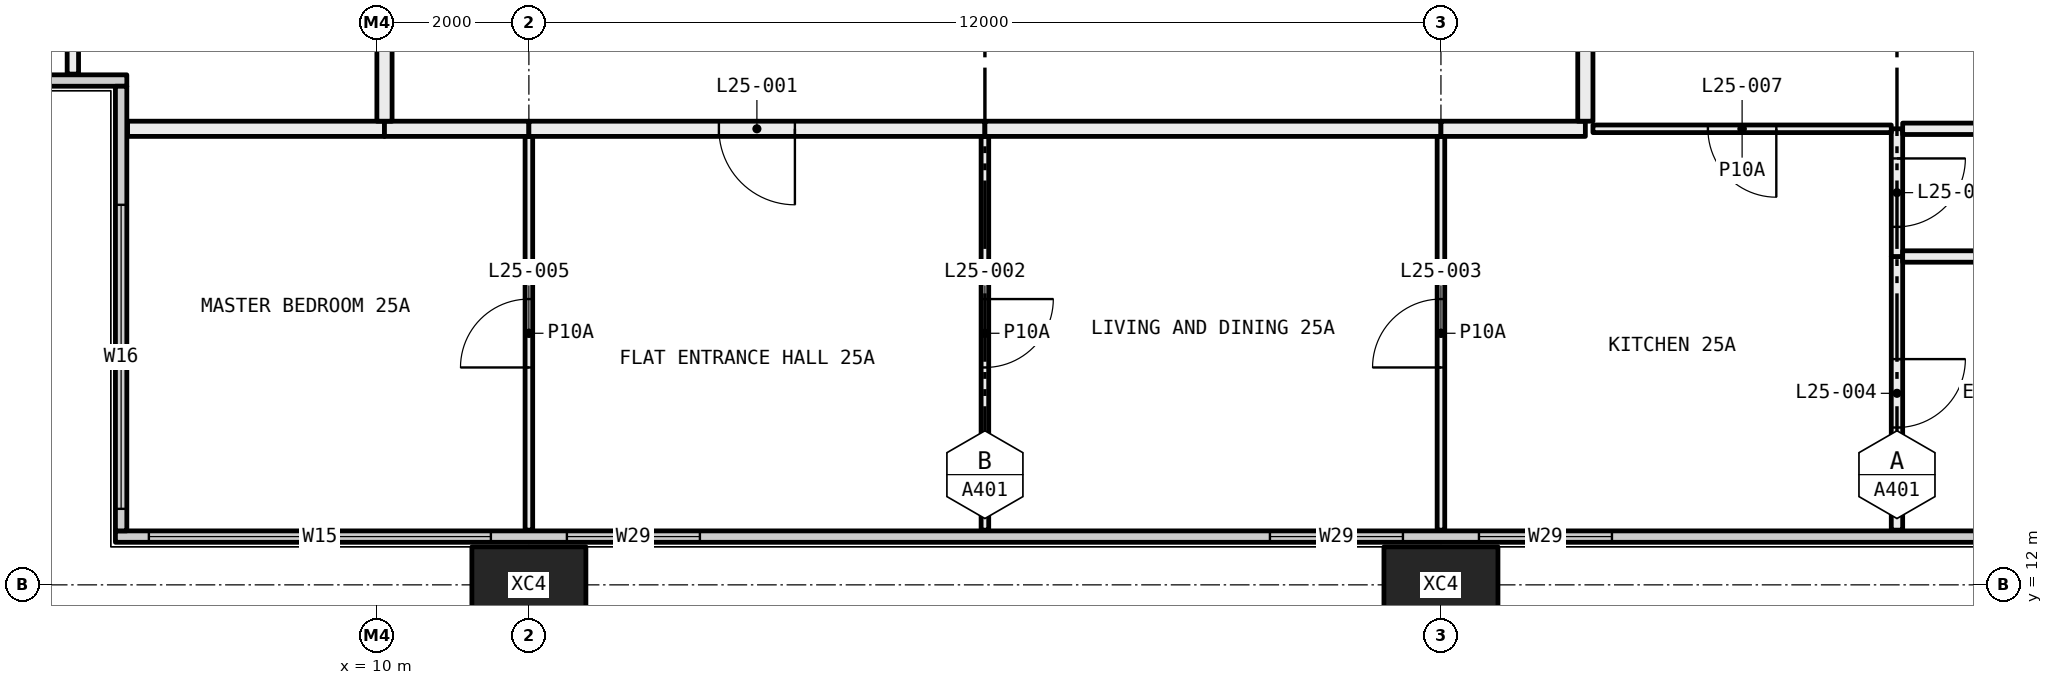
"""IFC4 building model, lengths in metres.
Left out: names, types, materials, properties, quantities, classifications, styles, units other than length and angle.
Written with IfcOpenShell. Run it as: python <this file> out.ifc"""

import sys

from ifc_helpers import new_model, si_unit, direction, frame, frame_2d, origin, origin_2d, place, context, subcontext, project, spatial, rectangle, hollow_rectangle, extrude, element, fill, save


model = new_model("IFC4")
c1 = context("Model", 3, precision=1e-05, world=origin(), true_north=direction((0.0, 1.0)))
c2 = subcontext(c1, "Body", "Model", "MODEL_VIEW")
j1 = project(units=[si_unit("LENGTHUNIT", "METRE"), si_unit("PLANEANGLEUNIT", "RADIAN")], contexts=[c1])
p1 = place(None, origin())
s1 = spatial("IfcSite", under=j1, at=p1, CompositionType="ELEMENT")
p2 = place(p1, origin())
s2 = spatial("IfcBuilding", under=s1, at=p2, CompositionType="ELEMENT")
p3 = place(p2, frame((0.0, 0.0, 100.05)))
s3 = spatial("IfcBuildingStorey", under=s2, at=p3, CompositionType="ELEMENT", Elevation=100.05)
for number, where, z_axis, x_axis in (
    (1, (12.0, 12.0, -0.4), (0.0, 0.0, 1.0), (1.0, 0.0, 0.0)),
    (2, (24.0, 12.0, -0.4), (0.0, 0.0, 1.0), (1.0, 0.0, 0.0)),
):
    element("IfcColumn", number, at=place(p3, frame(where, z_axis=z_axis, x_axis=x_axis)), inside=s3, PredefinedType="COLUMN", context=c2, shape_type="SweptSolid", body=[
        extrude(hollow_rectangle(XDim=1.5, YDim=1.0, WallThickness=0.06, at=origin_2d()), origin(), (0.0, 0.0, 1.0), 3.45),
    ])
p4 = place(p3, frame((6.56, 12.635, 0.0), z_axis=(0.0, 0.0, 1.0), x_axis=(1.0, 0.0, 0.0)))
e3 = element("IfcWall", 3, at=p4, inside=s3, PredefinedType="ELEMENTEDWALL", context=c2, shape_type="SweptSolid", body=[
    extrude(rectangle(XDim=58.88, YDim=0.15, at=frame_2d((29.44, 0.0))), origin(), (0.0, 0.0, 1.0), 3.05),
])
p5 = place(p4, frame((0.44, 0.0, 0.45)))
e4 = element("IfcOpeningElement", 4, at=p5, cuts=e3, PredefinedType="OPENING", context=c2, shape_type="SweptSolid", body=[
    extrude(rectangle(XDim=4.5, YDim=2.55, at=frame_2d((2.25, 1.275))), frame((0.0, 0.085, 0.0), z_axis=(0.0, -1.0, 0.0), x_axis=(1.0, 0.0, 0.0)), (0.0, 0.0, 1.0), 0.17),
])
p6 = place(p4, frame((5.94, 0.0, 0.45)))
e5 = element("IfcOpeningElement", 5, at=p6, cuts=e3, PredefinedType="OPENING", context=c2, shape_type="SweptSolid", body=[
    extrude(rectangle(XDim=1.75, YDim=2.55, at=frame_2d((0.875, 1.275))), frame((0.0, 0.085, 0.0), z_axis=(0.0, -1.0, 0.0), x_axis=(1.0, 0.0, 0.0)), (0.0, 0.0, 1.0), 0.17),
])
p7 = place(p4, frame((15.19, 0.0, 0.45)))
e6 = element("IfcOpeningElement", 6, at=p7, cuts=e3, PredefinedType="OPENING", context=c2, shape_type="SweptSolid", body=[
    extrude(rectangle(XDim=1.75, YDim=2.55, at=frame_2d((0.875, 1.275))), frame((0.0, 0.085, 0.0), z_axis=(0.0, -1.0, 0.0), x_axis=(1.0, 0.0, 0.0)), (0.0, 0.0, 1.0), 0.17),
])
p8 = place(p4, frame((17.94, 0.0, 0.45)))
e7 = element("IfcOpeningElement", 7, at=p8, cuts=e3, PredefinedType="OPENING", context=c2, shape_type="SweptSolid", body=[
    extrude(rectangle(XDim=1.75, YDim=2.55, at=frame_2d((0.875, 1.275))), frame((0.0, 0.085, 0.0), z_axis=(0.0, -1.0, 0.0), x_axis=(1.0, 0.0, 0.0)), (0.0, 0.0, 1.0), 0.17),
])
p9 = place(p4, frame((27.19, 0.0, 0.45)))
e8 = element("IfcOpeningElement", 8, at=p9, cuts=e3, PredefinedType="OPENING", context=c2, shape_type="SweptSolid", body=[
    extrude(rectangle(XDim=1.75, YDim=2.55, at=frame_2d((0.875, 1.275))), frame((0.0, 0.085, 0.0), z_axis=(0.0, -1.0, 0.0), x_axis=(1.0, 0.0, 0.0)), (0.0, 0.0, 1.0), 0.17),
])
p10 = place(p4, frame((29.94, 0.0, 0.45)))
e9 = element("IfcOpeningElement", 9, at=p10, cuts=e3, PredefinedType="OPENING", context=c2, shape_type="SweptSolid", body=[
    extrude(rectangle(XDim=1.75, YDim=2.55, at=frame_2d((0.875, 1.275))), frame((0.0, 0.085, 0.0), z_axis=(0.0, -1.0, 0.0), x_axis=(1.0, 0.0, 0.0)), (0.0, 0.0, 1.0), 0.17),
])
p11 = place(p4, frame((39.19, 0.0, 0.45)))
e10 = element("IfcOpeningElement", 10, at=p11, cuts=e3, PredefinedType="OPENING", context=c2, shape_type="SweptSolid", body=[
    extrude(rectangle(XDim=1.75, YDim=2.55, at=frame_2d((0.875, 1.275))), frame((0.0, 0.085, 0.0), z_axis=(0.0, -1.0, 0.0), x_axis=(1.0, 0.0, 0.0)), (0.0, 0.0, 1.0), 0.17),
])
p12 = place(p4, frame((41.94, 0.0, 0.45)))
e11 = element("IfcOpeningElement", 11, at=p12, cuts=e3, PredefinedType="OPENING", context=c2, shape_type="SweptSolid", body=[
    extrude(rectangle(XDim=1.75, YDim=2.55, at=frame_2d((0.875, 1.275))), frame((0.0, 0.085, 0.0), z_axis=(0.0, -1.0, 0.0), x_axis=(1.0, 0.0, 0.0)), (0.0, 0.0, 1.0), 0.17),
])
p13 = place(p4, frame((51.19, 0.0, 0.45)))
e12 = element("IfcOpeningElement", 12, at=p13, cuts=e3, PredefinedType="OPENING", context=c2, shape_type="SweptSolid", body=[
    extrude(rectangle(XDim=1.75, YDim=2.55, at=frame_2d((0.875, 1.275))), frame((0.0, 0.085, 0.0), z_axis=(0.0, -1.0, 0.0), x_axis=(1.0, 0.0, 0.0)), (0.0, 0.0, 1.0), 0.17),
])
p14 = place(p4, frame((53.94, 0.0, 0.45)))
e13 = element("IfcOpeningElement", 13, at=p14, cuts=e3, PredefinedType="OPENING", context=c2, shape_type="SweptSolid", body=[
    extrude(rectangle(XDim=4.5, YDim=2.55, at=frame_2d((2.25, 1.275))), frame((0.0, 0.085, 0.0), z_axis=(0.0, -1.0, 0.0), x_axis=(1.0, 0.0, 0.0)), (0.0, 0.0, 1.0), 0.17),
])
p15 = place(p3, frame((0.56, 18.635, 0.0), z_axis=(0.0, 0.0, 1.0), x_axis=(1.0, 0.0, 0.0)))
e14 = element("IfcWall", 14, at=p15, inside=s3, PredefinedType="ELEMENTEDWALL", context=c2, shape_type="SweptSolid", body=[
    extrude(rectangle(XDim=6.15, YDim=0.15, at=frame_2d((3.075, 0.0))), origin(), (0.0, 0.0, 1.0), 3.05),
])
p16 = place(p15, frame((0.44, 0.0, 0.45)))
e15 = element("IfcOpeningElement", 15, at=p16, cuts=e14, PredefinedType="OPENING", context=c2, shape_type="SweptSolid", body=[
    extrude(rectangle(XDim=4.0, YDim=2.55, at=frame_2d((2.0, 1.275))), frame((0.0, 0.085, 0.0), z_axis=(0.0, -1.0, 0.0), x_axis=(1.0, 0.0, 0.0)), (0.0, 0.0, 1.0), 0.17),
])
p17 = place(p3, frame((6.635, 12.71, 0.0), z_axis=(0.0, 0.0, 1.0), x_axis=(0.0, 1.0, 0.0)))
e16 = element("IfcWall", 16, at=p17, inside=s3, PredefinedType="ELEMENTEDWALL", context=c2, shape_type="SweptSolid", body=[
    extrude(rectangle(XDim=5.85, YDim=0.15, at=frame_2d((2.925, 0.0))), origin(), (0.0, 0.0, 1.0), 3.05),
])
p18 = place(p17, frame((0.29, 0.0, 0.45)))
e17 = element("IfcOpeningElement", 17, at=p18, cuts=e16, PredefinedType="OPENING", context=c2, shape_type="SweptSolid", body=[
    extrude(rectangle(XDim=4.0, YDim=2.55, at=frame_2d((2.0, 1.275))), frame((0.0, 0.085, 0.0), z_axis=(0.0, -1.0, 0.0), x_axis=(1.0, 0.0, 0.0)), (0.0, 0.0, 1.0), 0.17),
])
p19 = place(p3, frame((12.0, 12.72, 0.0), z_axis=(0.0, 0.0, 1.0), x_axis=(0.0, 1.0, 0.0)))
e18 = element("IfcWall", 18, at=p19, inside=s3, PredefinedType="PARTITIONING", context=c2, shape_type="SweptSolid", body=[
    extrude(rectangle(XDim=5.18, YDim=0.1, at=frame_2d((2.59, 0.0))), origin(), (0.0, 0.0, 1.0), 3.05),
])
p20 = place(p19, frame((2.14, 0.0, 0.0)))
e19 = element("IfcOpeningElement", 19, at=p20, cuts=e18, PredefinedType="OPENING", context=c2, shape_type="SweptSolid", body=[
    extrude(rectangle(XDim=0.9, YDim=2.1, at=frame_2d((0.45, 1.05))), frame((0.0, 0.06, 0.0), z_axis=(0.0, -1.0, 0.0), x_axis=(1.0, 0.0, 0.0)), (0.0, 0.0, 1.0), 0.12),
])
p21 = place(p3, frame((10.1, 18.0, 0.0), z_axis=(0.0, 0.0, 1.0), x_axis=(-1.0, 0.0, 0.0)))
e20 = element("IfcWall", 20, at=p21, inside=s3, PredefinedType="PARTITIONING", context=c2, shape_type="SweptSolid", body=[
    extrude(rectangle(XDim=3.38, YDim=0.2, at=frame_2d((1.69, 0.0))), origin(), (0.0, 0.0, 1.0), 3.05),
])
p22 = place(p3, frame((12.0, 18.0, 0.0), z_axis=(0.0, 0.0, 1.0), x_axis=(-1.0, 0.0, 0.0)))
e21 = element("IfcWall", 21, at=p22, inside=s3, PredefinedType="PARTITIONING", context=c2, shape_type="SweptSolid", body=[
    extrude(rectangle(XDim=1.9, YDim=0.2, at=frame_2d((0.95, 0.0))), origin(), (0.0, 0.0, 1.0), 3.05),
])
p23 = place(p3, frame((18.0, 12.72, 0.0), z_axis=(0.0, 0.0, 1.0), x_axis=(0.0, 1.0, 0.0)))
e22 = element("IfcWall", 22, at=p23, inside=s3, PredefinedType="PARTITIONING", context=c2, shape_type="SweptSolid", body=[
    extrude(rectangle(XDim=5.18, YDim=0.1, at=frame_2d((2.59, 0.0))), origin(), (0.0, 0.0, 1.0), 3.05),
])
p24 = place(p23, frame((2.14, 0.0, 0.0)))
e23 = element("IfcOpeningElement", 23, at=p24, cuts=e22, PredefinedType="OPENING", context=c2, shape_type="SweptSolid", body=[
    extrude(rectangle(XDim=0.9, YDim=2.1, at=frame_2d((0.45, 1.05))), frame((0.0, 0.06, 0.0), z_axis=(0.0, -1.0, 0.0), x_axis=(1.0, 0.0, 0.0)), (0.0, 0.0, 1.0), 0.12),
])
p25 = place(p3, frame((18.0, 18.0, 0.0), z_axis=(0.0, 0.0, 1.0), x_axis=(-1.0, 0.0, 0.0)))
e24 = element("IfcWall", 24, at=p25, inside=s3, PredefinedType="PARTITIONING", context=c2, shape_type="SweptSolid", body=[
    extrude(rectangle(XDim=6.0, YDim=0.2, at=frame_2d((3.0, 0.0))), origin(), (0.0, 0.0, 1.0), 3.05),
])
p26 = place(p25, frame((2.5, 0.0, 0.0)))
e25 = element("IfcOpeningElement", 25, at=p26, cuts=e24, PredefinedType="OPENING", context=c2, shape_type="SweptSolid", body=[
    extrude(rectangle(XDim=1.0, YDim=2.1, at=frame_2d((0.5, 1.05))), frame((0.0, 0.11, 0.0), z_axis=(0.0, -1.0, 0.0), x_axis=(1.0, 0.0, 0.0)), (0.0, 0.0, 1.0), 0.22),
])
p27 = place(p3, frame((24.0, 12.72, 0.0), z_axis=(0.0, 0.0, 1.0), x_axis=(0.0, 1.0, 0.0)))
e26 = element("IfcWall", 26, at=p27, inside=s3, PredefinedType="PARTITIONING", context=c2, shape_type="SweptSolid", body=[
    extrude(rectangle(XDim=5.18, YDim=0.1, at=frame_2d((2.59, 0.0))), origin(), (0.0, 0.0, 1.0), 3.05),
])
p28 = place(p27, frame((2.14, 0.0, 0.0)))
e27 = element("IfcOpeningElement", 27, at=p28, cuts=e26, PredefinedType="OPENING", context=c2, shape_type="SweptSolid", body=[
    extrude(rectangle(XDim=0.9, YDim=2.1, at=frame_2d((0.45, 1.05))), frame((0.0, 0.06, 0.0), z_axis=(0.0, -1.0, 0.0), x_axis=(1.0, 0.0, 0.0)), (0.0, 0.0, 1.0), 0.12),
])
p29 = place(p3, frame((24.0, 18.0, 0.0), z_axis=(0.0, 0.0, 1.0), x_axis=(-1.0, 0.0, 0.0)))
e28 = element("IfcWall", 28, at=p29, inside=s3, PredefinedType="PARTITIONING", context=c2, shape_type="SweptSolid", body=[
    extrude(rectangle(XDim=6.0, YDim=0.2, at=frame_2d((3.0, 0.0))), origin(), (0.0, 0.0, 1.0), 3.05),
])
p30 = place(p3, frame((30.0, 12.72, 0.0), z_axis=(0.0, 0.0, 1.0), x_axis=(0.0, 1.0, 0.0)))
e29 = element("IfcWall", 29, at=p30, inside=s3, PredefinedType="PARTITIONING", context=c2, shape_type="SweptSolid", body=[
    extrude(rectangle(XDim=3.6, YDim=0.15, at=frame_2d((1.8, 0.0))), origin(), (0.0, 0.0, 1.0), 3.05),
])
p31 = place(p30, frame((1.35, 0.0, 0.0)))
e30 = element("IfcOpeningElement", 30, at=p31, cuts=e29, PredefinedType="OPENING", context=c2, shape_type="SweptSolid", body=[
    extrude(rectangle(XDim=0.9, YDim=2.1, at=frame_2d((0.45, 1.05))), frame((0.0, 0.085, 0.0), z_axis=(0.0, -1.0, 0.0), x_axis=(1.0, 0.0, 0.0)), (0.0, 0.0, 1.0), 0.17),
])
p32 = place(p3, frame((30.0, 16.32, 0.0), z_axis=(0.0, 0.0, 1.0), x_axis=(0.0, 1.0, 0.0)))
e31 = element("IfcWall", 31, at=p32, inside=s3, PredefinedType="PARTITIONING", context=c2, shape_type="SweptSolid", body=[
    extrude(rectangle(XDim=1.68, YDim=0.15, at=frame_2d((0.84, 0.0))), origin(), (0.0, 0.0, 1.0), 3.05),
])
p33 = place(p32, frame((0.39, 0.0, 0.0)))
e32 = element("IfcOpeningElement", 32, at=p33, cuts=e31, PredefinedType="OPENING", context=c2, shape_type="SweptSolid", body=[
    extrude(rectangle(XDim=0.9, YDim=2.1, at=frame_2d((0.45, 1.05))), frame((0.0, 0.085, 0.0), z_axis=(0.0, -1.0, 0.0), x_axis=(1.0, 0.0, 0.0)), (0.0, 0.0, 1.0), 0.17),
])
p34 = place(p3, frame((29.925, 18.0, 0.0), z_axis=(0.0, 0.0, 1.0), x_axis=(-1.0, 0.0, 0.0)))
e33 = element("IfcWall", 33, at=p34, inside=s3, PredefinedType="PARTITIONING", context=c2, shape_type="SweptSolid", body=[
    extrude(rectangle(XDim=3.925, YDim=0.1, at=frame_2d((1.962, 0.0))), origin(), (0.0, 0.0, 1.0), 3.05),
])
p35 = place(p34, frame((1.512, 0.0, 0.0)))
e34 = element("IfcOpeningElement", 34, at=p35, cuts=e33, PredefinedType="OPENING", context=c2, shape_type="SweptSolid", body=[
    extrude(rectangle(XDim=0.9, YDim=2.1, at=frame_2d((0.45, 1.05))), frame((0.0, 0.06, 0.0), z_axis=(0.0, -1.0, 0.0), x_axis=(1.0, 0.0, 0.0)), (0.0, 0.0, 1.0), 0.12),
])
p36 = place(p3, frame((25.9, 18.0, 0.0), z_axis=(0.0, 0.0, 1.0), x_axis=(-1.0, 0.0, 0.0)))
e35 = element("IfcWall", 35, at=p36, inside=s3, PredefinedType="PARTITIONING", context=c2, shape_type="SweptSolid", body=[
    extrude(rectangle(XDim=1.9, YDim=0.2, at=frame_2d((0.95, 0.0))), origin(), (0.0, 0.0, 1.0), 3.05),
])
p37 = place(p3, frame((35.9, 16.32, 0.0), z_axis=(0.0, 0.0, 1.0), x_axis=(-1.0, 0.0, 0.0)))
e36 = element("IfcWall", 36, at=p37, inside=s3, PredefinedType="PARTITIONING", context=c2, shape_type="SweptSolid", body=[
    extrude(rectangle(XDim=5.825, YDim=0.15, at=frame_2d((2.913, 0.0))), origin(), (0.0, 0.0, 1.0), 3.05),
])
p38 = place(p3, frame((31.5, 18.0, 0.0), z_axis=(0.0, 0.0, 1.0), x_axis=(-1.0, 0.0, 0.0)))
e37 = element("IfcWall", 37, at=p38, inside=s3, PredefinedType="PARTITIONING", context=c2, shape_type="SweptSolid", body=[
    extrude(rectangle(XDim=1.425, YDim=0.15, at=frame_2d((0.712, 0.0))), origin(), (0.0, 0.0, 1.0), 3.05),
])
p39 = place(p3, frame((25.9, 23.9, 0.0), z_axis=(0.0, 0.0, 1.0), x_axis=(0.0, -1.0, 0.0)))
e38 = element("IfcWall", 38, at=p39, inside=s3, PredefinedType="PARTITIONING", context=c2, shape_type="SweptSolid", body=[
    extrude(rectangle(XDim=5.8, YDim=0.2, at=frame_2d((2.9, 0.0))), origin(), (0.0, 0.0, 1.0), 3.05),
])
p40 = place(p3, frame((6.0, 18.72, 0.0), z_axis=(0.0, 0.0, 1.0), x_axis=(0.0, 1.0, 0.0)))
e39 = element("IfcWall", 39, at=p40, inside=s3, PredefinedType="PARTITIONING", context=c2, shape_type="SweptSolid", body=[
    extrude(rectangle(XDim=3.78, YDim=0.15, at=frame_2d((1.89, 0.0))), origin(), (0.0, 0.0, 1.0), 3.05),
])
p41 = place(p3, frame((10.1, 18.1, 0.0), z_axis=(0.0, 0.0, 1.0), x_axis=(0.0, 1.0, 0.0)))
e40 = element("IfcWall", 40, at=p41, inside=s3, PredefinedType="PARTITIONING", context=c2, shape_type="SweptSolid", body=[
    extrude(rectangle(XDim=4.4, YDim=0.2, at=frame_2d((2.2, 0.0))), origin(), (0.0, 0.0, 1.0), 3.05),
])
p42 = place(p5, origin())
e41 = element("IfcWindow", 41, at=p42, inside=s3, PartitioningType="SINGLE_PANEL", PredefinedType="WINDOW", context=c2, shape_type="SweptSolid", body=[
    extrude(rectangle(XDim=4.5, YDim=2.55, at=frame_2d((2.25, 1.275))), frame((0.0, 0.03, 0.0), z_axis=(0.0, -1.0, 0.0), x_axis=(1.0, 0.0, 0.0)), (0.0, 0.0, 1.0), 0.06),
])
fill(e4, e41)
p43 = place(p6, origin())
e42 = element("IfcWindow", 42, at=p43, inside=s3, PartitioningType="SINGLE_PANEL", PredefinedType="WINDOW", context=c2, shape_type="SweptSolid", body=[
    extrude(rectangle(XDim=1.75, YDim=2.55, at=frame_2d((0.875, 1.275))), frame((0.0, 0.03, 0.0), z_axis=(0.0, -1.0, 0.0), x_axis=(1.0, 0.0, 0.0)), (0.0, 0.0, 1.0), 0.06),
])
fill(e5, e42)
p44 = place(p7, origin())
e43 = element("IfcWindow", 43, at=p44, inside=s3, PartitioningType="SINGLE_PANEL", PredefinedType="WINDOW", context=c2, shape_type="SweptSolid", body=[
    extrude(rectangle(XDim=1.75, YDim=2.55, at=frame_2d((0.875, 1.275))), frame((0.0, 0.03, 0.0), z_axis=(0.0, -1.0, 0.0), x_axis=(1.0, 0.0, 0.0)), (0.0, 0.0, 1.0), 0.06),
])
fill(e6, e43)
p45 = place(p8, origin())
e44 = element("IfcWindow", 44, at=p45, inside=s3, PartitioningType="SINGLE_PANEL", PredefinedType="WINDOW", context=c2, shape_type="SweptSolid", body=[
    extrude(rectangle(XDim=1.75, YDim=2.55, at=frame_2d((0.875, 1.275))), frame((0.0, 0.03, 0.0), z_axis=(0.0, -1.0, 0.0), x_axis=(1.0, 0.0, 0.0)), (0.0, 0.0, 1.0), 0.06),
])
fill(e7, e44)
p46 = place(p18, origin())
e45 = element("IfcWindow", 45, at=p46, inside=s3, PartitioningType="SINGLE_PANEL", PredefinedType="WINDOW", context=c2, shape_type="SweptSolid", body=[
    extrude(rectangle(XDim=4.0, YDim=2.55, at=frame_2d((2.0, 1.275))), frame((0.0, 0.03, 0.0), z_axis=(0.0, -1.0, 0.0), x_axis=(1.0, 0.0, 0.0)), (0.0, 0.0, 1.0), 0.06),
])
fill(e17, e45)
p47 = place(p26, origin())
e46 = element("IfcDoor", 46, at=p47, inside=s3, OperationType="SINGLE_SWING_RIGHT", PredefinedType="DOOR", context=c2, shape_type="SweptSolid", body=[
    extrude(rectangle(XDim=1.0, YDim=2.1, at=frame_2d((0.5, 1.05))), frame((0.0, 0.025, 0.0), z_axis=(0.0, -1.0, 0.0), x_axis=(1.0, 0.0, 0.0)), (0.0, 0.0, 1.0), 0.05),
])
fill(e25, e46)
p48 = place(p24, frame((0.9, 0.0, 0.0), x_axis=(-1.0, 0.0, 0.0)))
e47 = element("IfcDoor", 47, at=p48, inside=s3, OperationType="SINGLE_SWING_RIGHT", PredefinedType="DOOR", context=c2, shape_type="SweptSolid", body=[
    extrude(rectangle(XDim=0.9, YDim=2.1, at=frame_2d((0.45, 1.05))), frame((0.0, 0.025, 0.0), z_axis=(0.0, -1.0, 0.0), x_axis=(1.0, 0.0, 0.0)), (0.0, 0.0, 1.0), 0.05),
])
fill(e23, e47)
p49 = place(p28, origin())
e48 = element("IfcDoor", 48, at=p49, inside=s3, OperationType="SINGLE_SWING_RIGHT", PredefinedType="DOOR", context=c2, shape_type="SweptSolid", body=[
    extrude(rectangle(XDim=0.9, YDim=2.1, at=frame_2d((0.45, 1.05))), frame((0.0, 0.025, 0.0), z_axis=(0.0, -1.0, 0.0), x_axis=(1.0, 0.0, 0.0)), (0.0, 0.0, 1.0), 0.05),
])
fill(e27, e48)
p50 = place(p31, frame((0.9, 0.0, 0.0), x_axis=(-1.0, 0.0, 0.0)))
e49 = element("IfcDoor", 49, at=p50, inside=s3, OperationType="SINGLE_SWING_RIGHT", PredefinedType="DOOR", context=c2, shape_type="SweptSolid", body=[
    extrude(rectangle(XDim=0.9, YDim=2.1, at=frame_2d((0.45, 1.05))), frame((0.0, 0.025, 0.0), z_axis=(0.0, -1.0, 0.0), x_axis=(1.0, 0.0, 0.0)), (0.0, 0.0, 1.0), 0.05),
])
fill(e30, e49)
p51 = place(p20, origin())
e50 = element("IfcDoor", 50, at=p51, inside=s3, OperationType="SINGLE_SWING_RIGHT", PredefinedType="DOOR", context=c2, shape_type="SweptSolid", body=[
    extrude(rectangle(XDim=0.9, YDim=2.1, at=frame_2d((0.45, 1.05))), frame((0.0, 0.025, 0.0), z_axis=(0.0, -1.0, 0.0), x_axis=(1.0, 0.0, 0.0)), (0.0, 0.0, 1.0), 0.05),
])
fill(e19, e50)
p52 = place(p33, frame((0.9, 0.0, 0.0), x_axis=(-1.0, 0.0, 0.0)))
e51 = element("IfcDoor", 51, at=p52, inside=s3, OperationType="SINGLE_SWING_RIGHT", PredefinedType="DOOR", context=c2, shape_type="SweptSolid", body=[
    extrude(rectangle(XDim=0.9, YDim=2.1, at=frame_2d((0.45, 1.05))), frame((0.0, 0.025, 0.0), z_axis=(0.0, -1.0, 0.0), x_axis=(1.0, 0.0, 0.0)), (0.0, 0.0, 1.0), 0.05),
])
fill(e32, e51)
p53 = place(p35, origin())
e52 = element("IfcDoor", 52, at=p53, inside=s3, OperationType="SINGLE_SWING_RIGHT", PredefinedType="DOOR", context=c2, shape_type="SweptSolid", body=[
    extrude(rectangle(XDim=0.9, YDim=2.1, at=frame_2d((0.45, 1.05))), frame((0.0, 0.025, 0.0), z_axis=(0.0, -1.0, 0.0), x_axis=(1.0, 0.0, 0.0)), (0.0, 0.0, 1.0), 0.05),
])
fill(e34, e52)
save(model, sys.argv[1])
